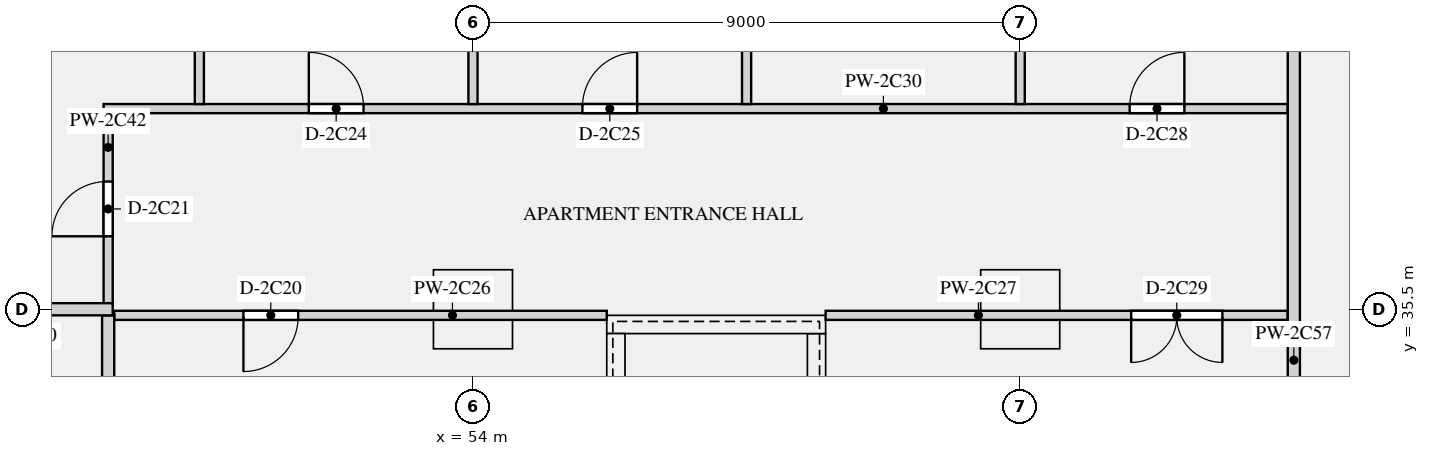
"""IFC4 building model, lengths in metres.
Left out: names, types, materials, properties, quantities, classifications, styles, units other than length and angle.
Written with IfcOpenShell. Run it as: python <this file> out.ifc"""

import sys

from ifc_helpers import new_model, si_unit, direction, frame, frame_2d, origin, origin_2d, place, context, subcontext, project, spatial, rectangle, extrude, element, fill, save


model = new_model("IFC4")
c1 = context("Model", 3, precision=1e-05, world=origin(), true_north=direction((0.0, 1.0)))
c2 = subcontext(c1, "Body", "Model", "MODEL_VIEW")
j1 = project(units=[si_unit("LENGTHUNIT", "METRE"), si_unit("PLANEANGLEUNIT", "RADIAN")], contexts=[c1])
p1 = place(None, origin())
s1 = spatial("IfcSite", under=j1, at=p1, CompositionType="ELEMENT")
p2 = place(p1, origin())
s2 = spatial("IfcBuilding", under=s1, at=p2, CompositionType="ELEMENT")
p3 = place(p2, frame((0.0, 0.0, 102.45)))
s3 = spatial("IfcBuildingStorey", under=s2, at=p3, CompositionType="ELEMENT", Elevation=102.45)
for number, where, z_axis, x_axis in (
    (1, (54.0, 35.5, 0.0), (0.0, 0.0, 1.0), (1.0, 0.0, 0.0)),
    (2, (63.0, 35.5, 0.0), (0.0, 0.0, 1.0), (1.0, 0.0, 0.0)),
):
    element("IfcColumn", number, at=place(p3, frame(where, z_axis=z_axis, x_axis=x_axis)), inside=s3, PredefinedType="COLUMN", context=c2, shape_type="SweptSolid", body=[
        extrude(rectangle(XDim=1.3, YDim=1.3, at=origin_2d()), origin(), (0.0, 0.0, 1.0), 3.15),
    ])
p4 = place(p3, frame((56.2, 35.25, 0.0), z_axis=(0.0, 0.0, 1.0), x_axis=(1.0, 0.0, 0.0)))
e3 = element("IfcWall", 3, at=p4, inside=s3, PredefinedType="SHEAR", context=c2, shape_type="SweptSolid", body=[
    extrude(rectangle(XDim=3.6, YDim=0.3, at=frame_2d((1.8, 0.0))), origin(), (0.0, 0.0, 1.0), 3.15),
])
for number, where, z_axis, x_axis in (
    (4, (56.35, 27.3, 0.0), (0.0, 0.0, 1.0), (0.0, 1.0, 0.0)),
    (5, (59.65, 27.3, 0.0), (0.0, 0.0, 1.0), (0.0, 1.0, 0.0)),
):
    element("IfcWall", number, at=place(p3, frame(where, z_axis=z_axis, x_axis=x_axis)), inside=s3, PredefinedType="SHEAR", context=c2, shape_type="SweptSolid", body=[
        extrude(rectangle(XDim=7.8, YDim=0.3, at=frame_2d((3.9, 0.0))), origin(), (0.0, 0.0, 1.0), 3.15),
    ])
p5 = place(p3, frame((45.0, 35.5, 0.0), z_axis=(0.0, 0.0, 1.0), x_axis=(1.0, 0.0, 0.0)))
e6 = element("IfcWall", 6, at=p5, inside=s3, PredefinedType="PARTITIONING", context=c2, shape_type="SweptSolid", body=[
    extrude(rectangle(XDim=3.075, YDim=0.2, at=frame_2d((1.538, 0.0))), origin(), (0.0, 0.0, 1.0), 2.83),
])
p6 = place(p3, frame((48.1, 35.4, 0.0), z_axis=(0.0, 0.0, 1.0), x_axis=(1.0, 0.0, 0.0)))
e7 = element("IfcWall", 7, at=p6, inside=s3, PredefinedType="PARTITIONING", context=c2, shape_type="SweptSolid", body=[
    extrude(rectangle(XDim=8.1, YDim=0.15, at=frame_2d((4.05, 0.0))), origin(), (0.0, 0.0, 1.0), 2.83),
])
p7 = place(p6, frame((2.125, 0.0, 0.0)))
e8 = element("IfcOpeningElement", 8, at=p7, cuts=e7, PredefinedType="OPENING", context=c2, shape_type="SweptSolid", body=[
    extrude(rectangle(XDim=0.9, YDim=2.1, at=frame_2d((0.45, 1.05))), frame((0.0, 0.085, 0.0), z_axis=(0.0, -1.0, 0.0), x_axis=(1.0, 0.0, 0.0)), (0.0, 0.0, 1.0), 0.17),
])
p8 = place(p3, frame((59.8, 35.4, 0.0), z_axis=(0.0, 0.0, 1.0), x_axis=(1.0, 0.0, 0.0)))
e9 = element("IfcWall", 9, at=p8, inside=s3, PredefinedType="PARTITIONING", context=c2, shape_type="SweptSolid", body=[
    extrude(rectangle(XDim=7.6, YDim=0.15, at=frame_2d((3.8, 0.0))), origin(), (0.0, 0.0, 1.0), 2.83),
])
p9 = place(p8, frame((5.025, 0.0, 0.0)))
e10 = element("IfcOpeningElement", 10, at=p9, cuts=e9, PredefinedType="OPENING", context=c2, shape_type="SweptSolid", body=[
    extrude(rectangle(XDim=1.5, YDim=2.1, at=frame_2d((0.75, 1.05))), frame((0.0, 0.085, 0.0), z_axis=(0.0, -1.0, 0.0), x_axis=(1.0, 0.0, 0.0)), (0.0, 0.0, 1.0), 0.17),
])
p10 = place(p3, frame((47.925, 38.8, 0.0), z_axis=(0.0, 0.0, 1.0), x_axis=(1.0, 0.0, 0.0)))
e11 = element("IfcWall", 11, at=p10, inside=s3, PredefinedType="PARTITIONING", context=c2, shape_type="SweptSolid", body=[
    extrude(rectangle(XDim=19.475, YDim=0.15, at=frame_2d((9.737, 0.0))), origin(), (0.0, 0.0, 1.0), 2.83),
])
p11 = place(p10, frame((3.375, 0.0, 0.0)))
e12 = element("IfcOpeningElement", 12, at=p11, cuts=e11, PredefinedType="OPENING", context=c2, shape_type="SweptSolid", body=[
    extrude(rectangle(XDim=0.9, YDim=2.1, at=frame_2d((0.45, 1.05))), frame((0.0, 0.085, 0.0), z_axis=(0.0, -1.0, 0.0), x_axis=(1.0, 0.0, 0.0)), (0.0, 0.0, 1.0), 0.17),
])
p12 = place(p10, frame((7.875, 0.0, 0.0)))
e13 = element("IfcOpeningElement", 13, at=p12, cuts=e11, PredefinedType="OPENING", context=c2, shape_type="SweptSolid", body=[
    extrude(rectangle(XDim=0.9, YDim=2.1, at=frame_2d((0.45, 1.05))), frame((0.0, 0.085, 0.0), z_axis=(0.0, -1.0, 0.0), x_axis=(1.0, 0.0, 0.0)), (0.0, 0.0, 1.0), 0.17),
])
p13 = place(p10, frame((16.875, 0.0, 0.0)))
e14 = element("IfcOpeningElement", 14, at=p13, cuts=e11, PredefinedType="OPENING", context=c2, shape_type="SweptSolid", body=[
    extrude(rectangle(XDim=0.9, YDim=2.1, at=frame_2d((0.45, 1.05))), frame((0.0, 0.085, 0.0), z_axis=(0.0, -1.0, 0.0), x_axis=(1.0, 0.0, 0.0)), (0.0, 0.0, 1.0), 0.17),
])
p14 = place(p3, frame((54.0, 38.875, 0.0), z_axis=(0.0, 0.0, 1.0), x_axis=(0.0, 1.0, 0.0)))
e15 = element("IfcWall", 15, at=p14, inside=s3, PredefinedType="PARTITIONING", context=c2, shape_type="SweptSolid", body=[
    extrude(rectangle(XDim=5.875, YDim=0.15, at=frame_2d((2.938, 0.0))), origin(), (0.0, 0.0, 1.0), 2.83),
])
p15 = place(p3, frame((48.0, 35.6, 0.0), z_axis=(0.0, 0.0, 1.0), x_axis=(0.0, 1.0, 0.0)))
e16 = element("IfcWall", 16, at=p15, inside=s3, PredefinedType="PARTITIONING", context=c2, shape_type="SweptSolid", body=[
    extrude(rectangle(XDim=3.125, YDim=0.15, at=frame_2d((1.562, 0.0))), origin(), (0.0, 0.0, 1.0), 2.83),
])
p16 = place(p15, frame((1.1, 0.0, 0.0)))
e17 = element("IfcOpeningElement", 17, at=p16, cuts=e16, PredefinedType="OPENING", context=c2, shape_type="SweptSolid", body=[
    extrude(rectangle(XDim=0.9, YDim=2.1, at=frame_2d((0.45, 1.05))), frame((0.0, 0.085, 0.0), z_axis=(0.0, -1.0, 0.0), x_axis=(1.0, 0.0, 0.0)), (0.0, 0.0, 1.0), 0.17),
])
p17 = place(p3, frame((48.0, 27.1, 0.0), z_axis=(0.0, 0.0, 1.0), x_axis=(0.0, 1.0, 0.0)))
e18 = element("IfcWall", 18, at=p17, inside=s3, PredefinedType="PARTITIONING", context=c2, shape_type="SweptSolid", body=[
    extrude(rectangle(XDim=8.3, YDim=0.2, at=frame_2d((4.15, 0.0))), origin(), (0.0, 0.0, 1.0), 2.83),
])
p18 = place(p17, frame((4.35, 0.0, 0.0)))
e19 = element("IfcOpeningElement", 19, at=p18, cuts=e18, PredefinedType="OPENING", context=c2, shape_type="SweptSolid", body=[
    extrude(rectangle(XDim=1.1, YDim=2.1, at=frame_2d((0.55, 1.05))), frame((0.0, 0.11, 0.0), z_axis=(0.0, -1.0, 0.0), x_axis=(1.0, 0.0, 0.0)), (0.0, 0.0, 1.0), 0.22),
])
p19 = place(p3, frame((49.5, 38.875, 0.0), z_axis=(0.0, 0.0, 1.0), x_axis=(0.0, 1.0, 0.0)))
e20 = element("IfcWall", 20, at=p19, inside=s3, PredefinedType="PARTITIONING", context=c2, shape_type="SweptSolid", body=[
    extrude(rectangle(XDim=5.875, YDim=0.15, at=frame_2d((2.938, 0.0))), origin(), (0.0, 0.0, 1.0), 2.83),
])
p20 = place(p3, frame((67.5, 24.575, 0.0), z_axis=(0.0, 0.0, 1.0), x_axis=(0.0, 1.0, 0.0)))
e21 = element("IfcWall", 21, at=p20, inside=s3, PredefinedType="PARTITIONING", context=c2, shape_type="SweptSolid", body=[
    extrude(rectangle(XDim=20.175, YDim=0.2, at=frame_2d((10.087, 0.0))), origin(), (0.0, 0.0, 1.0), 2.83),
])
p21 = place(p3, frame((58.5, 38.875, 0.0), z_axis=(0.0, 0.0, 1.0), x_axis=(0.0, 1.0, 0.0)))
e22 = element("IfcWall", 22, at=p21, inside=s3, PredefinedType="PARTITIONING", context=c2, shape_type="SweptSolid", body=[
    extrude(rectangle(XDim=5.875, YDim=0.15, at=frame_2d((2.938, 0.0))), origin(), (0.0, 0.0, 1.0), 2.83),
])
p22 = place(p21, frame((1.075, 0.0, 0.0)))
e23 = element("IfcOpeningElement", 23, at=p22, cuts=e22, PredefinedType="OPENING", context=c2, shape_type="SweptSolid", body=[
    extrude(rectangle(XDim=0.9, YDim=2.1, at=frame_2d((0.45, 1.05))), frame((0.0, 0.085, 0.0), z_axis=(0.0, -1.0, 0.0), x_axis=(1.0, 0.0, 0.0)), (0.0, 0.0, 1.0), 0.17),
])
p23 = place(p21, frame((4.125, 0.0, 0.0)))
e24 = element("IfcOpeningElement", 24, at=p23, cuts=e22, PredefinedType="OPENING", context=c2, shape_type="SweptSolid", body=[
    extrude(rectangle(XDim=0.9, YDim=2.1, at=frame_2d((0.45, 1.05))), frame((0.0, 0.085, 0.0), z_axis=(0.0, -1.0, 0.0), x_axis=(1.0, 0.0, 0.0)), (0.0, 0.0, 1.0), 0.17),
])
p24 = place(p3, frame((63.0, 38.875, 0.0), z_axis=(0.0, 0.0, 1.0), x_axis=(0.0, 1.0, 0.0)))
e25 = element("IfcWall", 25, at=p24, inside=s3, PredefinedType="PARTITIONING", context=c2, shape_type="SweptSolid", body=[
    extrude(rectangle(XDim=5.875, YDim=0.15, at=frame_2d((2.938, 0.0))), origin(), (0.0, 0.0, 1.0), 2.83),
])
p25 = place(p7, frame((0.9, 0.0, 0.0), z_axis=(0.0, 0.0, 1.0), x_axis=(-1.0, 0.0, 0.0)))
e26 = element("IfcDoor", 26, at=p25, inside=s3, OperationType="SINGLE_SWING_RIGHT", PredefinedType="DOOR", context=c2, shape_type="SweptSolid", body=[
    extrude(rectangle(XDim=0.9, YDim=2.1, at=frame_2d((0.45, 1.05))), frame((0.0, 0.025, 0.0), z_axis=(0.0, -1.0, 0.0), x_axis=(1.0, 0.0, 0.0)), (0.0, 0.0, 1.0), 0.05),
])
fill(e8, e26)
p26 = place(p16, origin())
e27 = element("IfcDoor", 27, at=p26, inside=s3, OperationType="SINGLE_SWING_LEFT", PredefinedType="DOOR", context=c2, shape_type="SweptSolid", body=[
    extrude(rectangle(XDim=0.9, YDim=2.1, at=frame_2d((0.45, 1.05))), frame((0.0, 0.025, 0.0), z_axis=(0.0, -1.0, 0.0), x_axis=(1.0, 0.0, 0.0)), (0.0, 0.0, 1.0), 0.05),
])
fill(e17, e27)
p27 = place(p11, origin())
e28 = element("IfcDoor", 28, at=p27, inside=s3, OperationType="SINGLE_SWING_LEFT", PredefinedType="DOOR", context=c2, shape_type="SweptSolid", body=[
    extrude(rectangle(XDim=0.9, YDim=2.1, at=frame_2d((0.45, 1.05))), frame((0.0, 0.025, 0.0), z_axis=(0.0, -1.0, 0.0), x_axis=(1.0, 0.0, 0.0)), (0.0, 0.0, 1.0), 0.05),
])
fill(e12, e28)
p28 = place(p12, origin())
e29 = element("IfcDoor", 29, at=p28, inside=s3, OperationType="SINGLE_SWING_RIGHT", PredefinedType="DOOR", context=c2, shape_type="SweptSolid", body=[
    extrude(rectangle(XDim=0.9, YDim=2.1, at=frame_2d((0.45, 1.05))), frame((0.0, 0.025, 0.0), z_axis=(0.0, -1.0, 0.0), x_axis=(1.0, 0.0, 0.0)), (0.0, 0.0, 1.0), 0.05),
])
fill(e13, e29)
p29 = place(p13, origin())
e30 = element("IfcDoor", 30, at=p29, inside=s3, OperationType="SINGLE_SWING_RIGHT", PredefinedType="DOOR", context=c2, shape_type="SweptSolid", body=[
    extrude(rectangle(XDim=0.9, YDim=2.1, at=frame_2d((0.45, 1.05))), frame((0.0, 0.025, 0.0), z_axis=(0.0, -1.0, 0.0), x_axis=(1.0, 0.0, 0.0)), (0.0, 0.0, 1.0), 0.05),
])
fill(e14, e30)
p30 = place(p9, frame((1.5, 0.0, 0.0), z_axis=(0.0, 0.0, 1.0), x_axis=(-1.0, 0.0, 0.0)))
e31 = element("IfcDoor", 31, at=p30, inside=s3, OperationType="DOUBLE_DOOR_SINGLE_SWING", PredefinedType="DOOR", context=c2, shape_type="SweptSolid", body=[
    extrude(rectangle(XDim=1.5, YDim=2.1, at=frame_2d((0.75, 1.05))), frame((0.0, 0.025, 0.0), z_axis=(0.0, -1.0, 0.0), x_axis=(1.0, 0.0, 0.0)), (0.0, 0.0, 1.0), 0.05),
])
fill(e10, e31)
save(model, sys.argv[1])
